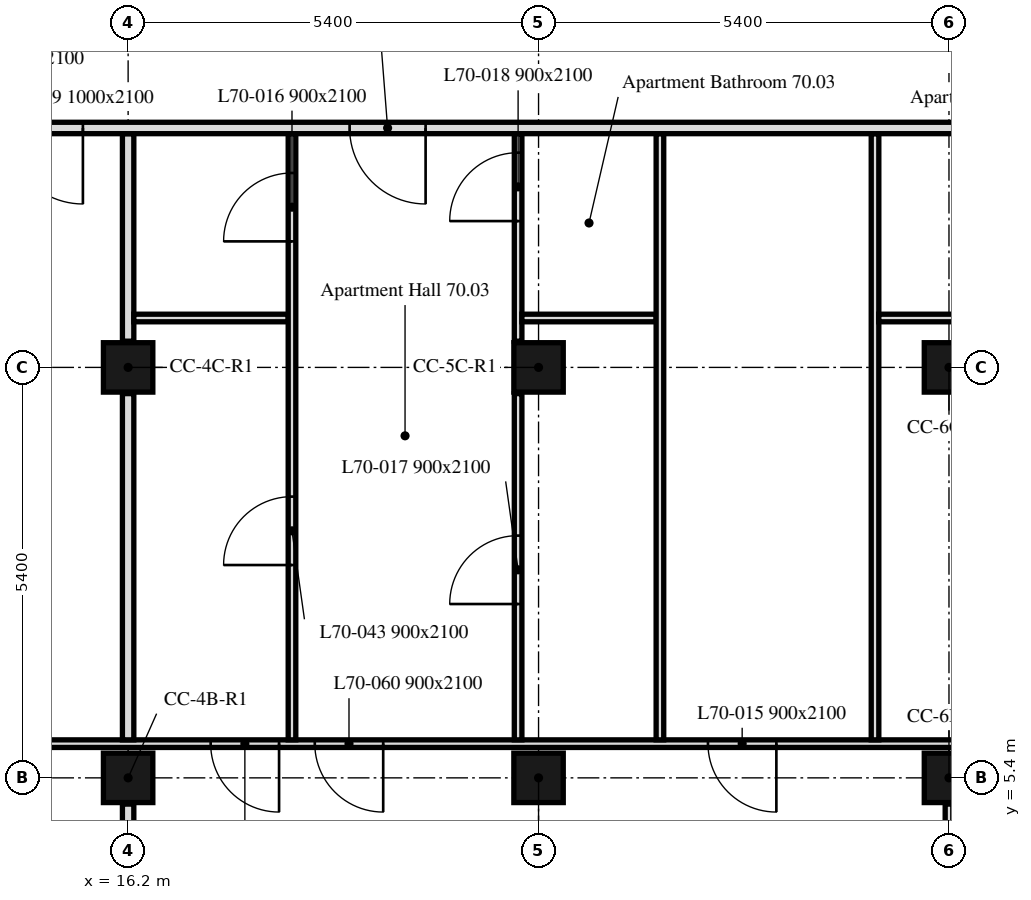
"""IFC4 building model, lengths in metres.
Left out: names, types, materials, properties, quantities, classifications, styles, units other than length and angle.
Written with IfcOpenShell. Run it as: python <this file> out.ifc"""

import sys

from ifc_helpers import new_model, si_unit, direction, frame, frame_2d, origin, origin_2d, place, context, subcontext, project, spatial, rectangle, extrude, element, fill, save


model = new_model("IFC4")
c1 = context("Model", 3, precision=1e-05, world=origin(), true_north=direction((0.0, 1.0)))
c2 = subcontext(c1, "Body", "Model", "MODEL_VIEW")
j1 = project(units=[si_unit("LENGTHUNIT", "METRE"), si_unit("PLANEANGLEUNIT", "RADIAN")], contexts=[c1])
p1 = place(None, origin())
s1 = spatial("IfcSite", under=j1, at=p1, CompositionType="ELEMENT")
p2 = place(p1, origin())
s2 = spatial("IfcBuilding", under=s1, at=p2, CompositionType="ELEMENT")
p3 = place(p2, frame((0.0, 0.0, 285.1)))
s3 = spatial("IfcBuildingStorey", under=s2, at=p3, CompositionType="ELEMENT", Elevation=285.1)
for number, where, z_axis, x_axis in (
    (1, (16.2, 5.4, 0.0), (0.0, 0.0, 1.0), (1.0, 0.0, 0.0)),
    (2, (21.6, 5.4, 0.0), (0.0, 0.0, 1.0), (1.0, 0.0, 0.0)),
    (3, (27.0, 5.4, 0.0), (0.0, 0.0, 1.0), (1.0, 0.0, 0.0)),
    (4, (16.2, 10.8, 0.0), (0.0, 0.0, 1.0), (1.0, 0.0, 0.0)),
    (5, (21.6, 10.8, 0.0), (0.0, 0.0, 1.0), (1.0, 0.0, 0.0)),
    (6, (27.0, 10.8, 0.0), (0.0, 0.0, 1.0), (1.0, 0.0, 0.0)),
):
    element("IfcColumn", number, at=place(p3, frame(where, z_axis=z_axis, x_axis=x_axis)), inside=s3, PredefinedType="COLUMN", context=c2, shape_type="SweptSolid", body=[
        extrude(rectangle(XDim=0.65, YDim=0.65, at=origin_2d()), origin(), (0.0, 0.0, 1.0), 3.0),
    ])
p4 = place(p3, frame((37.652, 5.85, 0.0), z_axis=(0.0, 0.0, 1.0), x_axis=(-1.0, 0.0, 0.0)))
e7 = element("IfcWall", 7, at=p4, inside=s3, PredefinedType="PARTITIONING", context=c2, shape_type="SweptSolid", body=[
    extrude(rectangle(XDim=31.501, YDim=0.1, at=frame_2d((15.75, 0.0))), origin(), (0.0, 0.0, 1.0), 2.4),
])
p5 = place(p4, frame((12.923, 0.0, 0.0)))
e8 = element("IfcOpeningElement", 8, at=p5, cuts=e7, PredefinedType="OPENING", context=c2, shape_type="SweptSolid", body=[
    extrude(rectangle(XDim=0.9, YDim=2.1, at=frame_2d((0.45, 1.05))), frame((0.0, 0.05, 0.0), z_axis=(0.0, -1.0, 0.0), x_axis=(1.0, 0.0, 0.0)), (0.0, 0.0, 1.0), 0.1),
])
p6 = place(p4, frame((29.422, 0.0, 0.0)))
e9 = element("IfcOpeningElement", 9, at=p6, cuts=e7, PredefinedType="OPENING", context=c2, shape_type="SweptSolid", body=[
    extrude(rectangle(XDim=0.9, YDim=2.1, at=frame_2d((0.45, 1.05))), frame((0.0, 0.05, 0.0), z_axis=(0.0, -1.0, 0.0), x_axis=(1.0, 0.0, 0.0)), (0.0, 0.0, 1.0), 0.1),
])
p7 = place(p4, frame((28.182, 0.0, 0.0)))
e10 = element("IfcOpeningElement", 10, at=p7, cuts=e7, PredefinedType="OPENING", context=c2, shape_type="SweptSolid", body=[
    extrude(rectangle(XDim=0.9, YDim=2.1, at=frame_2d((0.45, 1.05))), frame((0.0, 0.05, 0.0), z_axis=(0.0, -1.0, 0.0), x_axis=(1.0, 0.0, 0.0)), (0.0, 0.0, 1.0), 0.1),
])
p8 = place(p4, frame((23.942, 0.0, 0.0)))
e11 = element("IfcOpeningElement", 11, at=p8, cuts=e7, PredefinedType="OPENING", context=c2, shape_type="SweptSolid", body=[
    extrude(rectangle(XDim=0.9, YDim=2.1, at=frame_2d((0.45, 1.05))), frame((0.0, 0.05, 0.0), z_axis=(0.0, -1.0, 0.0), x_axis=(1.0, 0.0, 0.0)), (0.0, 0.0, 1.0), 0.1),
])
p9 = place(p4, frame((22.572, 0.0, 0.0)))
e12 = element("IfcOpeningElement", 12, at=p9, cuts=e7, PredefinedType="OPENING", context=c2, shape_type="SweptSolid", body=[
    extrude(rectangle(XDim=0.9, YDim=2.1, at=frame_2d((0.45, 1.05))), frame((0.0, 0.05, 0.0), z_axis=(0.0, -1.0, 0.0), x_axis=(1.0, 0.0, 0.0)), (0.0, 0.0, 1.0), 0.1),
])
p10 = place(p4, frame((19.466, 0.0, 0.0)))
e13 = element("IfcOpeningElement", 13, at=p10, cuts=e7, PredefinedType="OPENING", context=c2, shape_type="SweptSolid", body=[
    extrude(rectangle(XDim=0.9, YDim=2.1, at=frame_2d((0.45, 1.05))), frame((0.0, 0.05, 0.0), z_axis=(0.0, -1.0, 0.0), x_axis=(1.0, 0.0, 0.0)), (0.0, 0.0, 1.0), 0.1),
])
p11 = place(p4, frame((9.19, 0.0, 0.0)))
e14 = element("IfcOpeningElement", 14, at=p11, cuts=e7, PredefinedType="OPENING", context=c2, shape_type="SweptSolid", body=[
    extrude(rectangle(XDim=0.9, YDim=2.1, at=frame_2d((0.45, 1.05))), frame((0.0, 0.05, 0.0), z_axis=(0.0, -1.0, 0.0), x_axis=(1.0, 0.0, 0.0)), (0.0, 0.0, 1.0), 0.1),
])
p12 = place(p4, frame((7.512, 0.0, 0.0)))
e15 = element("IfcOpeningElement", 15, at=p12, cuts=e7, PredefinedType="OPENING", context=c2, shape_type="SweptSolid", body=[
    extrude(rectangle(XDim=0.9, YDim=2.1, at=frame_2d((0.45, 1.05))), frame((0.0, 0.05, 0.0), z_axis=(0.0, -1.0, 0.0), x_axis=(1.0, 0.0, 0.0)), (0.0, 0.0, 1.0), 0.1),
])
p13 = place(p4, frame((2.952, 0.0, 0.0)))
e16 = element("IfcOpeningElement", 16, at=p13, cuts=e7, PredefinedType="OPENING", context=c2, shape_type="SweptSolid", body=[
    extrude(rectangle(XDim=0.9, YDim=2.1, at=frame_2d((0.45, 1.05))), frame((0.0, 0.05, 0.0), z_axis=(0.0, -1.0, 0.0), x_axis=(1.0, 0.0, 0.0)), (0.0, 0.0, 1.0), 0.1),
])
p14 = place(p4, frame((18.096, 0.0, 0.0)))
e17 = element("IfcOpeningElement", 17, at=p14, cuts=e7, PredefinedType="OPENING", context=c2, shape_type="SweptSolid", body=[
    extrude(rectangle(XDim=0.9, YDim=2.1, at=frame_2d((0.45, 1.05))), frame((0.0, 0.05, 0.0), z_axis=(0.0, -1.0, 0.0), x_axis=(1.0, 0.0, 0.0)), (0.0, 0.0, 1.0), 0.1),
])
p15 = place(p3, frame((16.2, 0.751, 0.0), z_axis=(0.0, 0.0, 1.0), x_axis=(0.0, 1.0, 0.0)))
e18 = element("IfcWall", 18, at=p15, inside=s3, PredefinedType="PARTITIONING", context=c2, shape_type="SweptSolid", body=[
    extrude(rectangle(XDim=4.304, YDim=0.15, at=frame_2d((2.152, 0.0))), origin(), (0.0, 0.0, 1.0), 2.4),
])
p16 = place(p3, frame((16.2, 5.9, 0.0), z_axis=(0.0, 0.0, 1.0), x_axis=(0.0, 1.0, 0.0)))
e19 = element("IfcWall", 19, at=p16, inside=s3, PredefinedType="PARTITIONING", context=c2, shape_type="SweptSolid", body=[
    extrude(rectangle(XDim=4.555, YDim=0.15, at=frame_2d((2.278, 0.0))), origin(), (0.0, 0.0, 1.0), 2.4),
])
p17 = place(p3, frame((16.2, 11.145, 0.0), z_axis=(0.0, 0.0, 1.0), x_axis=(0.0, 1.0, 0.0)))
e20 = element("IfcWall", 20, at=p17, inside=s3, PredefinedType="PARTITIONING", context=c2, shape_type="SweptSolid", body=[
    extrude(rectangle(XDim=2.73, YDim=0.15, at=frame_2d((1.365, 0.0))), origin(), (0.0, 0.0, 1.0), 2.4),
])
p18 = place(p3, frame((27.0, 0.751, 0.0), z_axis=(0.0, 0.0, 1.0), x_axis=(0.0, 1.0, 0.0)))
e21 = element("IfcWall", 21, at=p18, inside=s3, PredefinedType="PARTITIONING", context=c2, shape_type="SweptSolid", body=[
    extrude(rectangle(XDim=4.304, YDim=0.1, at=frame_2d((2.152, 0.0))), origin(), (0.0, 0.0, 1.0), 2.4),
])
p19 = place(p18, frame((1.18, 0.0, 0.0)))
e22 = element("IfcOpeningElement", 22, at=p19, cuts=e21, PredefinedType="OPENING", context=c2, shape_type="SweptSolid", body=[
    extrude(rectangle(XDim=0.9, YDim=2.1, at=frame_2d((0.45, 1.05))), frame((0.0, 0.05, 0.0), z_axis=(0.0, -1.0, 0.0), x_axis=(1.0, 0.0, 0.0)), (0.0, 0.0, 1.0), 0.1),
])
p20 = place(p3, frame((18.306, 11.45, 0.0), z_axis=(0.0, 0.0, 1.0), x_axis=(-1.0, 0.0, 0.0)))
e23 = element("IfcWall", 23, at=p20, inside=s3, PredefinedType="PARTITIONING", context=c2, shape_type="SweptSolid", body=[
    extrude(rectangle(XDim=2.031, YDim=0.1, at=frame_2d((1.016, 0.0))), origin(), (0.0, 0.0, 1.0), 3.0),
])
p21 = place(p3, frame((18.356, 5.9, 0.0), z_axis=(0.0, 0.0, 1.0), x_axis=(0.0, 1.0, 0.0)))
e24 = element("IfcWall", 24, at=p21, inside=s3, PredefinedType="PARTITIONING", context=c2, shape_type="SweptSolid", body=[
    extrude(rectangle(XDim=7.975, YDim=0.1, at=frame_2d((3.988, 0.0))), origin(), (0.0, 0.0, 1.0), 3.0),
])
p22 = place(p21, frame((6.558, 0.0, 0.0)))
e25 = element("IfcOpeningElement", 25, at=p22, cuts=e24, PredefinedType="OPENING", context=c2, shape_type="SweptSolid", body=[
    extrude(rectangle(XDim=0.9, YDim=2.1, at=frame_2d((0.45, 1.05))), frame((0.0, 0.05, 0.0), z_axis=(0.0, -1.0, 0.0), x_axis=(1.0, 0.0, 0.0)), (0.0, 0.0, 1.0), 0.1),
])
p23 = place(p21, frame((2.3, 0.0, 0.0)))
e26 = element("IfcOpeningElement", 26, at=p23, cuts=e24, PredefinedType="OPENING", context=c2, shape_type="SweptSolid", body=[
    extrude(rectangle(XDim=0.9, YDim=2.1, at=frame_2d((0.45, 1.05))), frame((0.0, 0.05, 0.0), z_axis=(0.0, -1.0, 0.0), x_axis=(1.0, 0.0, 0.0)), (0.0, 0.0, 1.0), 0.1),
])
p24 = place(p3, frame((21.331, 5.9, 0.0), z_axis=(0.0, 0.0, 1.0), x_axis=(0.0, 1.0, 0.0)))
e27 = element("IfcWall", 27, at=p24, inside=s3, PredefinedType="PARTITIONING", context=c2, shape_type="SweptSolid", body=[
    extrude(rectangle(XDim=4.555, YDim=0.1, at=frame_2d((2.278, 0.0))), origin(), (0.0, 0.0, 1.0), 3.0),
])
p25 = place(p24, frame((1.787, 0.0, 0.0)))
e28 = element("IfcOpeningElement", 28, at=p25, cuts=e27, PredefinedType="OPENING", context=c2, shape_type="SweptSolid", body=[
    extrude(rectangle(XDim=0.9, YDim=2.1, at=frame_2d((0.45, 1.05))), frame((0.0, 0.05, 0.0), z_axis=(0.0, -1.0, 0.0), x_axis=(1.0, 0.0, 0.0)), (0.0, 0.0, 1.0), 0.1),
])
p26 = place(p3, frame((21.331, 11.145, 0.0), z_axis=(0.0, 0.0, 1.0), x_axis=(0.0, 1.0, 0.0)))
e29 = element("IfcWall", 29, at=p26, inside=s3, PredefinedType="PARTITIONING", context=c2, shape_type="SweptSolid", body=[
    extrude(rectangle(XDim=2.73, YDim=0.1, at=frame_2d((1.365, 0.0))), origin(), (0.0, 0.0, 1.0), 3.0),
])
p27 = place(p26, frame((1.58, 0.0, 0.0)))
e30 = element("IfcOpeningElement", 30, at=p27, cuts=e29, PredefinedType="OPENING", context=c2, shape_type="SweptSolid", body=[
    extrude(rectangle(XDim=0.9, YDim=2.1, at=frame_2d((0.45, 1.05))), frame((0.0, 0.05, 0.0), z_axis=(0.0, -1.0, 0.0), x_axis=(1.0, 0.0, 0.0)), (0.0, 0.0, 1.0), 0.1),
])
p28 = place(p3, frame((23.147, 11.45, 0.0), z_axis=(0.0, 0.0, 1.0), x_axis=(-1.0, 0.0, 0.0)))
e31 = element("IfcWall", 31, at=p28, inside=s3, PredefinedType="PARTITIONING", context=c2, shape_type="SweptSolid", body=[
    extrude(rectangle(XDim=1.766, YDim=0.1, at=frame_2d((0.883, 0.0))), origin(), (0.0, 0.0, 1.0), 2.4),
])
for number, where, z_axis, x_axis in (
    (32, (23.197, 5.9, 0.0), (0.0, 0.0, 1.0), (0.0, 1.0, 0.0)),
    (33, (26.027, 5.9, 0.0), (0.0, 0.0, 1.0), (0.0, 1.0, 0.0)),
):
    element("IfcWall", number, at=place(p3, frame(where, z_axis=z_axis, x_axis=x_axis)), inside=s3, PredefinedType="PARTITIONING", context=c2, shape_type="SweptSolid", body=[
        extrude(rectangle(XDim=7.975, YDim=0.1, at=frame_2d((3.988, 0.0))), origin(), (0.0, 0.0, 1.0), 3.0),
    ])
p29 = place(p3, frame((28.712, 11.45, 0.0), z_axis=(0.0, 0.0, 1.0), x_axis=(-1.0, 0.0, 0.0)))
e34 = element("IfcWall", 34, at=p29, inside=s3, PredefinedType="PARTITIONING", context=c2, shape_type="SweptSolid", body=[
    extrude(rectangle(XDim=2.635, YDim=0.1, at=frame_2d((1.317, 0.0))), origin(), (0.0, 0.0, 1.0), 2.4),
])
p30 = place(p29, frame((0.25, 0.0, 0.0)))
e35 = element("IfcOpeningElement", 35, at=p30, cuts=e34, PredefinedType="OPENING", context=c2, shape_type="SweptSolid", body=[
    extrude(rectangle(XDim=0.9, YDim=2.1, at=frame_2d((0.45, 1.05))), frame((0.0, 0.05, 0.0), z_axis=(0.0, -1.0, 0.0), x_axis=(1.0, 0.0, 0.0)), (0.0, 0.0, 1.0), 0.1),
])
p31 = place(p3, frame((47.849, 13.95, 0.0), z_axis=(0.0, 0.0, 1.0), x_axis=(-1.0, 0.0, 0.0)))
e36 = element("IfcWall", 36, at=p31, inside=s3, PredefinedType="PARTITIONING", context=c2, shape_type="SweptSolid", body=[
    extrude(rectangle(XDim=41.698, YDim=0.15, at=frame_2d((20.849, 0.0))), origin(), (0.0, 0.0, 1.0), 2.4),
])
p32 = place(p31, frame((37.749, 0.0, 0.0)))
e37 = element("IfcOpeningElement", 37, at=p32, cuts=e36, PredefinedType="OPENING", context=c2, shape_type="SweptSolid", body=[
    extrude(rectangle(XDim=1.0, YDim=2.1, at=frame_2d((0.5, 1.05))), frame((0.0, 0.075, 0.0), z_axis=(0.0, -1.0, 0.0), x_axis=(1.0, 0.0, 0.0)), (0.0, 0.0, 1.0), 0.15),
])
p33 = place(p31, frame((32.244, 0.0, 0.0)))
e38 = element("IfcOpeningElement", 38, at=p33, cuts=e36, PredefinedType="OPENING", context=c2, shape_type="SweptSolid", body=[
    extrude(rectangle(XDim=1.0, YDim=2.1, at=frame_2d((0.5, 1.05))), frame((0.0, 0.075, 0.0), z_axis=(0.0, -1.0, 0.0), x_axis=(1.0, 0.0, 0.0)), (0.0, 0.0, 1.0), 0.15),
])
p34 = place(p31, frame((27.735, 0.0, 0.0)))
e39 = element("IfcOpeningElement", 39, at=p34, cuts=e36, PredefinedType="OPENING", context=c2, shape_type="SweptSolid", body=[
    extrude(rectangle(XDim=1.0, YDim=2.1, at=frame_2d((0.5, 1.05))), frame((0.0, 0.075, 0.0), z_axis=(0.0, -1.0, 0.0), x_axis=(1.0, 0.0, 0.0)), (0.0, 0.0, 1.0), 0.15),
])
p35 = place(p31, frame((8.347, 0.0, 0.0)))
e40 = element("IfcOpeningElement", 40, at=p35, cuts=e36, PredefinedType="OPENING", context=c2, shape_type="SweptSolid", body=[
    extrude(rectangle(XDim=1.0, YDim=2.1, at=frame_2d((0.5, 1.05))), frame((0.0, 0.075, 0.0), z_axis=(0.0, -1.0, 0.0), x_axis=(1.0, 0.0, 0.0)), (0.0, 0.0, 1.0), 0.15),
])
p36 = place(p5, origin())
e41 = element("IfcDoor", 41, at=p36, inside=s3, OperationType="SINGLE_SWING_RIGHT", PredefinedType="DOOR", context=c2, shape_type="SweptSolid", body=[
    extrude(rectangle(XDim=0.9, YDim=2.1, at=frame_2d((0.45, 1.05))), frame((0.0, 0.025, 0.0), z_axis=(0.0, -1.0, 0.0), x_axis=(1.0, 0.0, 0.0)), (0.0, 0.0, 1.0), 0.05),
])
fill(e8, e41)
p37 = place(p22, origin())
e42 = element("IfcDoor", 42, at=p37, inside=s3, OperationType="SINGLE_SWING_LEFT", PredefinedType="DOOR", context=c2, shape_type="SweptSolid", body=[
    extrude(rectangle(XDim=0.9, YDim=2.1, at=frame_2d((0.45, 1.05))), frame((0.0, 0.025, 0.0), z_axis=(0.0, -1.0, 0.0), x_axis=(1.0, 0.0, 0.0)), (0.0, 0.0, 1.0), 0.05),
])
fill(e25, e42)
p38 = place(p25, origin())
e43 = element("IfcDoor", 43, at=p38, inside=s3, OperationType="SINGLE_SWING_RIGHT", PredefinedType="DOOR", context=c2, shape_type="SweptSolid", body=[
    extrude(rectangle(XDim=0.9, YDim=2.1, at=frame_2d((0.45, 1.05))), frame((0.0, 0.025, 0.0), z_axis=(0.0, -1.0, 0.0), x_axis=(1.0, 0.0, 0.0)), (0.0, 0.0, 1.0), 0.05),
])
fill(e28, e43)
p39 = place(p27, origin())
e44 = element("IfcDoor", 44, at=p39, inside=s3, OperationType="SINGLE_SWING_RIGHT", PredefinedType="DOOR", context=c2, shape_type="SweptSolid", body=[
    extrude(rectangle(XDim=0.9, YDim=2.1, at=frame_2d((0.45, 1.05))), frame((0.0, 0.025, 0.0), z_axis=(0.0, -1.0, 0.0), x_axis=(1.0, 0.0, 0.0)), (0.0, 0.0, 1.0), 0.05),
])
fill(e30, e44)
p40 = place(p10, origin())
e45 = element("IfcDoor", 45, at=p40, inside=s3, OperationType="SINGLE_SWING_LEFT", PredefinedType="DOOR", context=c2, shape_type="SweptSolid", body=[
    extrude(rectangle(XDim=0.9, YDim=2.1, at=frame_2d((0.45, 1.05))), frame((0.0, 0.025, 0.0), z_axis=(0.0, -1.0, 0.0), x_axis=(1.0, 0.0, 0.0)), (0.0, 0.0, 1.0), 0.05),
])
fill(e13, e45)
p41 = place(p23, origin())
e46 = element("IfcDoor", 46, at=p41, inside=s3, OperationType="SINGLE_SWING_RIGHT", PredefinedType="DOOR", context=c2, shape_type="SweptSolid", body=[
    extrude(rectangle(XDim=0.9, YDim=2.1, at=frame_2d((0.45, 1.05))), frame((0.0, 0.025, 0.0), z_axis=(0.0, -1.0, 0.0), x_axis=(1.0, 0.0, 0.0)), (0.0, 0.0, 1.0), 0.05),
])
fill(e26, e46)
p42 = place(p33, origin())
e47 = element("IfcDoor", 47, at=p42, inside=s3, OperationType="SINGLE_SWING_LEFT", PredefinedType="DOOR", context=c2, shape_type="SweptSolid", body=[
    extrude(rectangle(XDim=1.0, YDim=2.1, at=frame_2d((0.5, 1.05))), frame((0.0, 0.025, 0.0), z_axis=(0.0, -1.0, 0.0), x_axis=(1.0, 0.0, 0.0)), (0.0, 0.0, 1.0), 0.05),
])
fill(e38, e47)
p43 = place(p14, origin())
e48 = element("IfcDoor", 48, at=p43, inside=s3, OperationType="SINGLE_SWING_RIGHT", PredefinedType="DOOR", context=c2, shape_type="SweptSolid", body=[
    extrude(rectangle(XDim=0.9, YDim=2.1, at=frame_2d((0.45, 1.05))), frame((0.0, 0.025, 0.0), z_axis=(0.0, -1.0, 0.0), x_axis=(1.0, 0.0, 0.0)), (0.0, 0.0, 1.0), 0.05),
])
fill(e17, e48)
p44 = place(p34, origin())
e49 = element("IfcDoor", 49, at=p44, inside=s3, OperationType="SINGLE_SWING_RIGHT", PredefinedType="DOOR", context=c2, shape_type="SweptSolid", body=[
    extrude(rectangle(XDim=1.0, YDim=2.1, at=frame_2d((0.5, 1.05))), frame((0.0, 0.025, 0.0), z_axis=(0.0, -1.0, 0.0), x_axis=(1.0, 0.0, 0.0)), (0.0, 0.0, 1.0), 0.05),
])
fill(e39, e49)
save(model, sys.argv[1])
